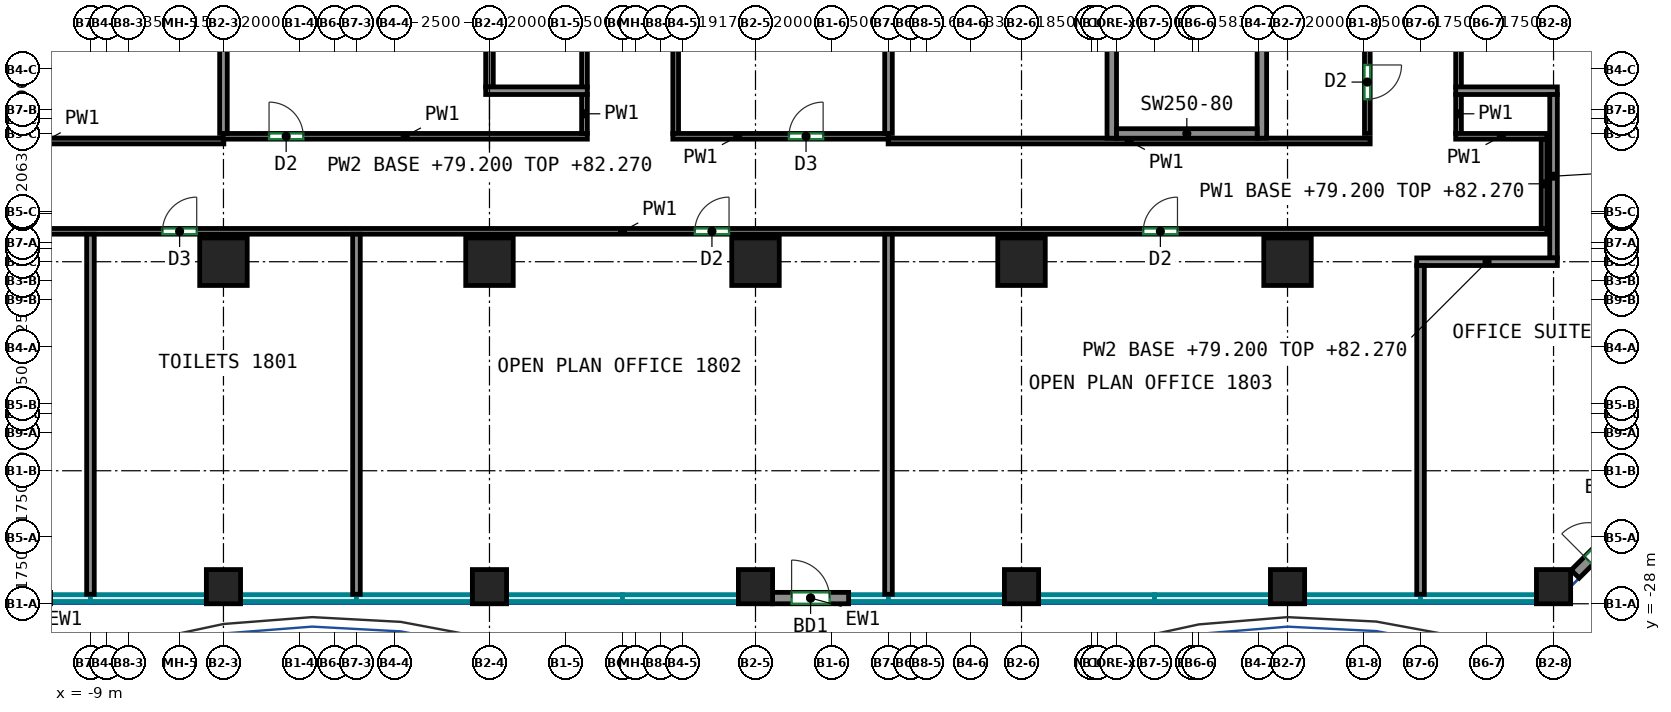
"""IFC4 building model, lengths in metres.
Left out: names, types, materials, properties, quantities, classifications, styles, units other than length and angle.
Written with IfcOpenShell. Run it as: python <this file> out.ifc"""

import sys

from ifc_helpers import new_model, si_unit, direction, frame, frame_2d, origin, origin_2d, place, context, subcontext, project, spatial, rectangle, extrude, source, transform, mapped, element, fill, save


model = new_model("IFC4")
c1 = context("Model", 3, precision=1e-05, world=origin(), true_north=direction((0.0, 1.0)))
c2 = subcontext(c1, "Body", "Model", "MODEL_VIEW")
j1 = project(units=[si_unit("LENGTHUNIT", "METRE"), si_unit("PLANEANGLEUNIT", "RADIAN")], contexts=[c1])
p1 = place(None, origin())
s1 = spatial("IfcSite", under=j1, at=p1, CompositionType="ELEMENT")
p2 = place(p1, origin())
s2 = spatial("IfcBuilding", under=s1, at=p2, CompositionType="ELEMENT")
p3 = place(p2, frame((0.0, 0.0, 79.2)))
s3 = spatial("IfcBuildingStorey", under=s2, at=p3, CompositionType="ELEMENT", Elevation=79.2)
m1 = source(origin(), c2, "Body", "SweptSolid", [
    extrude(rectangle(XDim=0.9, YDim=0.9, at=origin_2d()), origin(), (0.0, 0.0, 1.0), 3.72),
])
p4 = place(p3, frame((-5.5, -27.55, 0.0), z_axis=(0.0, 0.0, 1.0), x_axis=(1.0, 0.0, 0.0)))
e1 = element("IfcColumn", 1, at=p4, inside=s3, PredefinedType="COLUMN", context=c2, shape_type="MappedRepresentation", body=[
    mapped(m1, transform((0.0, 0.0, 0.0))),
])
m2 = source(origin(), c2, "Body", "SweptSolid", [
    extrude(rectangle(XDim=1.25, YDim=1.25, at=origin_2d()), origin(), (0.0, 0.0, 1.0), 3.72),
])
p5 = place(p3, frame((-5.5, -19.0, 0.0), z_axis=(0.0, 0.0, 1.0), x_axis=(1.0, 0.0, 0.0)))
e2 = element("IfcColumn", 2, at=p5, inside=s3, PredefinedType="COLUMN", context=c2, shape_type="MappedRepresentation", body=[
    mapped(m2, transform((0.0, 0.0, 0.0))),
])
p6 = place(p3, frame((1.5, -27.55, 0.0), z_axis=(0.0, 0.0, 1.0), x_axis=(1.0, 0.0, 0.0)))
e3 = element("IfcColumn", 3, at=p6, inside=s3, PredefinedType="COLUMN", context=c2, shape_type="MappedRepresentation", body=[
    mapped(m1, transform((0.0, 0.0, 0.0))),
])
p7 = place(p3, frame((1.5, -19.0, 0.0), z_axis=(0.0, 0.0, 1.0), x_axis=(1.0, 0.0, 0.0)))
e4 = element("IfcColumn", 4, at=p7, inside=s3, PredefinedType="COLUMN", context=c2, shape_type="MappedRepresentation", body=[
    mapped(m2, transform((0.0, 0.0, 0.0))),
])
p8 = place(p3, frame((8.5, -27.55, 0.0), z_axis=(0.0, 0.0, 1.0), x_axis=(1.0, 0.0, 0.0)))
e5 = element("IfcColumn", 5, at=p8, inside=s3, PredefinedType="COLUMN", context=c2, shape_type="MappedRepresentation", body=[
    mapped(m1, transform((0.0, 0.0, 0.0))),
])
p9 = place(p3, frame((8.5, -19.0, 0.0), z_axis=(0.0, 0.0, 1.0), x_axis=(1.0, 0.0, 0.0)))
e6 = element("IfcColumn", 6, at=p9, inside=s3, PredefinedType="COLUMN", context=c2, shape_type="MappedRepresentation", body=[
    mapped(m2, transform((0.0, 0.0, 0.0))),
])
p10 = place(p3, frame((15.5, -27.55, 0.0), z_axis=(0.0, 0.0, 1.0), x_axis=(1.0, 0.0, 0.0)))
e7 = element("IfcColumn", 7, at=p10, inside=s3, PredefinedType="COLUMN", context=c2, shape_type="MappedRepresentation", body=[
    mapped(m1, transform((0.0, 0.0, 0.0))),
])
p11 = place(p3, frame((15.5, -19.0, 0.0), z_axis=(0.0, 0.0, 1.0), x_axis=(1.0, 0.0, 0.0)))
e8 = element("IfcColumn", 8, at=p11, inside=s3, PredefinedType="COLUMN", context=c2, shape_type="MappedRepresentation", body=[
    mapped(m2, transform((0.0, 0.0, 0.0))),
])
p12 = place(p3, frame((22.5, -27.55, 0.0), z_axis=(0.0, 0.0, 1.0), x_axis=(1.0, 0.0, 0.0)))
e9 = element("IfcColumn", 9, at=p12, inside=s3, PredefinedType="COLUMN", context=c2, shape_type="MappedRepresentation", body=[
    mapped(m1, transform((0.0, 0.0, 0.0))),
])
p13 = place(p3, frame((22.5, -19.0, 0.0), z_axis=(0.0, 0.0, 1.0), x_axis=(1.0, 0.0, 0.0)))
e10 = element("IfcColumn", 10, at=p13, inside=s3, PredefinedType="COLUMN", context=c2, shape_type="MappedRepresentation", body=[
    mapped(m2, transform((0.0, 0.0, 0.0))),
])
p14 = place(p3, frame((29.5, -27.55, 0.0), z_axis=(0.0, 0.0, 1.0), x_axis=(1.0, 0.0, 0.0)))
e11 = element("IfcColumn", 11, at=p14, inside=s3, PredefinedType="COLUMN", context=c2, shape_type="MappedRepresentation", body=[
    mapped(m1, transform((0.0, 0.0, 0.0))),
])
m3 = source(origin(), c2, "Body", "SweptSolid", [
    extrude(rectangle(XDim=8.0, YDim=0.25, at=frame_2d((4.0, 0.0))), origin(), (0.0, 0.0, 1.0), 3.72),
])
for number, where, z_axis, x_axis in (
    (12, (17.875, -15.75, 0.0), (0.0, 0.0, 1.0), (0.0, 1.0, 0.0)),
    (13, (21.825, -15.75, 0.0), (0.0, 0.0, 1.0), (0.0, 1.0, 0.0)),
):
    element("IfcWall", number, at=place(p3, frame(where, z_axis=z_axis, x_axis=x_axis)), inside=s3, PredefinedType="SHEAR", context=c2, shape_type="MappedRepresentation", body=[
        mapped(m3, transform((0.0, 0.0, 0.0))),
    ])
m4 = source(origin(), c2, "Body", "SweptSolid", [
    extrude(rectangle(XDim=3.7, YDim=0.25, at=frame_2d((1.85, 0.0))), origin(), (0.0, 0.0, 1.0), 3.72),
])
p15 = place(p3, frame((18.0, -15.625, 0.0), z_axis=(0.0, 0.0, 1.0), x_axis=(1.0, 0.0, 0.0)))
e14 = element("IfcWall", 14, at=p15, inside=s3, PredefinedType="SHEAR", context=c2, shape_type="MappedRepresentation", body=[
    mapped(m4, transform((0.0, 0.0, 0.0))),
])
m5 = source(origin(), c2, "Body", "SweptSolid", [
    extrude(rectangle(XDim=2.0, YDim=0.3, at=frame_2d((1.0, 0.0))), origin(), (0.0, 0.0, 1.0), 3.72),
])
p16 = place(p3, frame((8.95, -27.85, 0.0), z_axis=(0.0, 0.0, 1.0), x_axis=(1.0, 0.0, 0.0)))
e15 = element("IfcWall", 15, at=p16, inside=s3, PredefinedType="SOLIDWALL", context=c2, shape_type="MappedRepresentation", body=[
    mapped(m5, transform((0.0, 0.0, 0.0))),
])
p17 = place(p16, frame((0.5, 0.0, 0.0)))
e16 = element("IfcOpeningElement", 16, at=p17, cuts=e15, PredefinedType="OPENING", context=c2, shape_type="SweptSolid", body=[
    extrude(rectangle(XDim=1.0, YDim=2.1, at=frame_2d((0.5, 1.05))), frame((0.0, 0.16, 0.0), z_axis=(0.0, -1.0, 0.0), x_axis=(1.0, 0.0, 0.0)), (0.0, 0.0, 1.0), 0.32),
])
m6 = source(origin(), c2, "Body", "SweptSolid", [
    extrude(rectangle(XDim=2.0, YDim=0.3, at=frame_2d((1.0, 0.0))), origin(), (0.0, 0.0, 1.0), 3.72),
])
p18 = place(p3, frame((30.069, -27.219, 0.0), z_axis=(0.0, 0.0, 1.0), x_axis=(0.707106781187, 0.707106781187, 0.0)))
e17 = element("IfcWall", 17, at=p18, inside=s3, PredefinedType="SOLIDWALL", context=c2, shape_type="MappedRepresentation", body=[
    mapped(m6, transform((0.0, 0.0, 0.0))),
])
p19 = place(p18, frame((0.5, 0.0, 0.0)))
e18 = element("IfcOpeningElement", 18, at=p19, cuts=e17, PredefinedType="OPENING", context=c2, shape_type="SweptSolid", body=[
    extrude(rectangle(XDim=1.0, YDim=2.1, at=frame_2d((0.5, 1.05))), frame((0.0, 0.16, 0.0), z_axis=(0.0, -1.0, 0.0), x_axis=(1.0, 0.0, 0.0)), (0.0, 0.0, 1.0), 0.32),
])
p20 = place(p3, frame((-19.325, -18.2, 0.0), z_axis=(0.0, 0.0, 1.0), x_axis=(1.0, 0.0, 0.0)))
e19 = element("IfcWall", 19, at=p20, inside=s3, PredefinedType="PARTITIONING", context=c2, shape_type="SweptSolid", body=[
    extrude(rectangle(XDim=48.65, YDim=0.15, at=frame_2d((24.325, 0.0))), origin(), (0.0, 0.0, 1.0), 3.72),
])
p21 = place(p20, frame((12.221, 0.0, 0.0)))
e20 = element("IfcOpeningElement", 20, at=p21, cuts=e19, PredefinedType="OPENING", context=c2, shape_type="SweptSolid", body=[
    extrude(rectangle(XDim=0.9, YDim=2.1, at=frame_2d((0.45, 1.05))), frame((0.0, 0.085, 0.0), z_axis=(0.0, -1.0, 0.0), x_axis=(1.0, 0.0, 0.0)), (0.0, 0.0, 1.0), 0.17),
])
p22 = place(p20, frame((26.229, 0.0, 0.0)))
e21 = element("IfcOpeningElement", 21, at=p22, cuts=e19, PredefinedType="OPENING", context=c2, shape_type="SweptSolid", body=[
    extrude(rectangle(XDim=0.9, YDim=2.1, at=frame_2d((0.45, 1.05))), frame((0.0, 0.085, 0.0), z_axis=(0.0, -1.0, 0.0), x_axis=(1.0, 0.0, 0.0)), (0.0, 0.0, 1.0), 0.17),
])
p23 = place(p20, frame((38.029, 0.0, 0.0)))
e22 = element("IfcOpeningElement", 22, at=p23, cuts=e19, PredefinedType="OPENING", context=c2, shape_type="SweptSolid", body=[
    extrude(rectangle(XDim=0.9, YDim=2.1, at=frame_2d((0.45, 1.05))), frame((0.0, 0.085, 0.0), z_axis=(0.0, -1.0, 0.0), x_axis=(1.0, 0.0, 0.0)), (0.0, 0.0, 1.0), 0.17),
])
p24 = place(p3, frame((-14.9, -15.825, 0.0), z_axis=(0.0, 0.0, 1.0), x_axis=(1.0, 0.0, 0.0)))
e23 = element("IfcWall", 23, at=p24, inside=s3, PredefinedType="PARTITIONING", context=c2, shape_type="SweptSolid", body=[
    extrude(rectangle(XDim=9.41, YDim=0.15, at=frame_2d((4.705, 0.0))), origin(), (0.0, 0.0, 1.0), 3.72),
])
p25 = place(p3, frame((-5.51, -15.7, 0.0), z_axis=(0.0, 0.0, 1.0), x_axis=(1.0, 0.0, 0.0)))
e24 = element("IfcWall", 24, at=p25, inside=s3, PredefinedType="PARTITIONING", context=c2, shape_type="SweptSolid", body=[
    extrude(rectangle(XDim=9.585, YDim=0.15, at=frame_2d((4.792, 0.0))), origin(), (0.0, 0.0, 1.0), 3.72),
])
p26 = place(p25, frame((1.21, 0.0, 0.0)))
e25 = element("IfcOpeningElement", 25, at=p26, cuts=e24, PredefinedType="OPENING", context=c2, shape_type="SweptSolid", body=[
    extrude(rectangle(XDim=0.9, YDim=2.1, at=frame_2d((0.45, 1.05))), frame((0.0, 0.085, 0.0), z_axis=(0.0, -1.0, 0.0), x_axis=(1.0, 0.0, 0.0)), (0.0, 0.0, 1.0), 0.17),
])
p27 = place(p3, frame((4.0, -15.625, 0.0), z_axis=(0.0, 0.0, 1.0), x_axis=(0.0, 1.0, 0.0)))
e26 = element("IfcWall", 26, at=p27, inside=s3, PredefinedType="PARTITIONING", context=c2, shape_type="SweptSolid", body=[
    extrude(rectangle(XDim=1.035, YDim=0.15, at=frame_2d((0.518, 0.0))), origin(), (0.0, 0.0, 1.0), 3.72),
])
p28 = place(p3, frame((4.0, -14.41, 0.0), z_axis=(0.0, 0.0, 1.0), x_axis=(0.0, 1.0, 0.0)))
e27 = element("IfcWall", 27, at=p28, inside=s3, PredefinedType="PARTITIONING", context=c2, shape_type="SweptSolid", body=[
    extrude(rectangle(XDim=16.635, YDim=0.15, at=frame_2d((8.317, 0.0))), origin(), (0.0, 0.0, 1.0), 3.72),
])
p29 = place(p28, frame((6.114, 0.0, 0.0)))
e28 = element("IfcOpeningElement", 28, at=p29, cuts=e27, PredefinedType="OPENING", context=c2, shape_type="SweptSolid", body=[
    extrude(rectangle(XDim=1.0, YDim=2.1, at=frame_2d((0.5, 1.05))), frame((0.0, 0.085, 0.0), z_axis=(0.0, -1.0, 0.0), x_axis=(1.0, 0.0, 0.0)), (0.0, 0.0, 1.0), 0.17),
])
p30 = place(p3, frame((27.0, -15.625, 0.0), z_axis=(0.0, 0.0, 1.0), x_axis=(0.0, 1.0, 0.0)))
e29 = element("IfcWall", 29, at=p30, inside=s3, PredefinedType="PARTITIONING", context=c2, shape_type="SweptSolid", body=[
    extrude(rectangle(XDim=1.035, YDim=0.15, at=frame_2d((0.518, 0.0))), origin(), (0.0, 0.0, 1.0), 3.72),
])
p31 = place(p3, frame((26.925, -15.7, 0.0), z_axis=(0.0, 0.0, 1.0), x_axis=(1.0, 0.0, 0.0)))
e30 = element("IfcWall", 30, at=p31, inside=s3, PredefinedType="PARTITIONING", context=c2, shape_type="SweptSolid", body=[
    extrude(rectangle(XDim=2.4, YDim=0.15, at=frame_2d((1.2, 0.0))), origin(), (0.0, 0.0, 1.0), 3.72),
])
p32 = place(p3, frame((29.25, -18.125, 0.0), z_axis=(0.0, 0.0, 1.0), x_axis=(0.0, 1.0, 0.0)))
e31 = element("IfcWall", 31, at=p32, inside=s3, PredefinedType="PARTITIONING", context=c2, shape_type="SweptSolid", body=[
    extrude(rectangle(XDim=2.35, YDim=0.15, at=frame_2d((1.175, 0.0))), origin(), (0.0, 0.0, 1.0), 3.07),
])
p33 = place(p3, frame((6.4, -15.625, 0.0), z_axis=(0.0, 0.0, 1.0), x_axis=(0.0, 1.0, 0.0)))
e32 = element("IfcWall", 32, at=p33, inside=s3, PredefinedType="PARTITIONING", context=c2, shape_type="SweptSolid", body=[
    extrude(rectangle(XDim=5.535, YDim=0.15, at=frame_2d((2.768, 0.0))), origin(), (0.0, 0.0, 1.0), 3.72),
])
p34 = place(p3, frame((6.325, -15.7, 0.0), z_axis=(0.0, 0.0, 1.0), x_axis=(1.0, 0.0, 0.0)))
e33 = element("IfcWall", 33, at=p34, inside=s3, PredefinedType="PARTITIONING", context=c2, shape_type="SweptSolid", body=[
    extrude(rectangle(XDim=5.685, YDim=0.15, at=frame_2d((2.843, 0.0))), origin(), (0.0, 0.0, 1.0), 3.72),
])
p35 = place(p34, frame((3.055, 0.0, 0.0)))
e34 = element("IfcOpeningElement", 34, at=p35, cuts=e33, PredefinedType="OPENING", context=c2, shape_type="SweptSolid", body=[
    extrude(rectangle(XDim=0.9, YDim=2.1, at=frame_2d((0.45, 1.05))), frame((0.0, 0.085, 0.0), z_axis=(0.0, -1.0, 0.0), x_axis=(1.0, 0.0, 0.0)), (0.0, 0.0, 1.0), 0.17),
])
p36 = place(p3, frame((11.99, -15.825, 0.0), z_axis=(0.0, 0.0, 1.0), x_axis=(1.0, 0.0, 0.0)))
e35 = element("IfcWall", 35, at=p36, inside=s3, PredefinedType="PARTITIONING", context=c2, shape_type="SweptSolid", body=[
    extrude(rectangle(XDim=12.685, YDim=0.15, at=frame_2d((6.343, 0.0))), origin(), (0.0, 0.0, 1.0), 3.72),
])
p37 = place(p3, frame((24.6, 2.225, 0.0), z_axis=(0.0, 0.0, 1.0), x_axis=(0.0, -1.0, 0.0)))
e36 = element("IfcWall", 36, at=p37, inside=s3, PredefinedType="PARTITIONING", context=c2, shape_type="SweptSolid", body=[
    extrude(rectangle(XDim=17.85, YDim=0.15, at=frame_2d((8.925, 0.0))), origin(), (0.0, 0.0, 1.0), 3.72),
])
p38 = place(p37, frame((16.048, 0.0, 0.0)))
e37 = element("IfcOpeningElement", 37, at=p38, cuts=e36, PredefinedType="OPENING", context=c2, shape_type="SweptSolid", body=[
    extrude(rectangle(XDim=0.9, YDim=2.1, at=frame_2d((0.45, 1.05))), frame((0.0, 0.085, 0.0), z_axis=(0.0, -1.0, 0.0), x_axis=(1.0, 0.0, 0.0)), (0.0, 0.0, 1.0), 0.17),
])
p39 = place(p3, frame((27.0, -14.41, 0.0), z_axis=(0.0, 0.0, 1.0), x_axis=(0.0, 1.0, 0.0)))
e38 = element("IfcWall", 38, at=p39, inside=s3, PredefinedType="PARTITIONING", context=c2, shape_type="SweptSolid", body=[
    extrude(rectangle(XDim=16.635, YDim=0.15, at=frame_2d((8.317, 0.0))), origin(), (0.0, 0.0, 1.0), 3.72),
])
p40 = place(p39, frame((4.41, 0.0, 0.0)))
e39 = element("IfcOpeningElement", 39, at=p40, cuts=e38, PredefinedType="OPENING", context=c2, shape_type="SweptSolid", body=[
    extrude(rectangle(XDim=1.0, YDim=2.1, at=frame_2d((0.5, 1.05))), frame((0.0, 0.085, 0.0), z_axis=(0.0, -1.0, 0.0), x_axis=(1.0, 0.0, 0.0)), (0.0, 0.0, 1.0), 0.17),
])
p41 = place(p3, frame((-9.0, -27.75, 0.0), z_axis=(0.0, 0.0, 1.0), x_axis=(0.0, 1.0, 0.0)))
e40 = element("IfcWall", 40, at=p41, inside=s3, PredefinedType="PARTITIONING", context=c2, shape_type="SweptSolid", body=[
    extrude(rectangle(XDim=9.474, YDim=0.2, at=frame_2d((4.737, 0.0))), origin(), (0.0, 0.0, 1.0), 3.72),
])
p42 = place(p3, frame((-5.5, -15.624, 0.0), z_axis=(0.0, 0.0, 1.0), x_axis=(0.0, 1.0, 0.0)))
e41 = element("IfcWall", 41, at=p42, inside=s3, PredefinedType="PARTITIONING", context=c2, shape_type="SweptSolid", body=[
    extrude(rectangle(XDim=4.999, YDim=0.2, at=frame_2d((2.5, 0.0))), origin(), (0.0, 0.0, 1.0), 3.07),
])
p43 = place(p3, frame((-2.0, -27.75, 0.0), z_axis=(0.0, 0.0, 1.0), x_axis=(0.0, 1.0, 0.0)))
e42 = element("IfcWall", 42, at=p43, inside=s3, PredefinedType="PARTITIONING", context=c2, shape_type="SweptSolid", body=[
    extrude(rectangle(XDim=9.474, YDim=0.2, at=frame_2d((4.737, 0.0))), origin(), (0.0, 0.0, 1.0), 3.72),
])
p44 = place(p3, frame((1.5, -14.4, 0.0), z_axis=(0.0, 0.0, 1.0), x_axis=(0.0, 1.0, 0.0)))
e43 = element("IfcWall", 43, at=p44, inside=s3, PredefinedType="PARTITIONING", context=c2, shape_type="SweptSolid", body=[
    extrude(rectangle(XDim=3.775, YDim=0.2, at=frame_2d((1.887, 0.0))), origin(), (0.0, 0.0, 1.0), 3.07),
])
p45 = place(p3, frame((1.4, -14.5, 0.0), z_axis=(0.0, 0.0, 1.0), x_axis=(1.0, 0.0, 0.0)))
e44 = element("IfcWall", 44, at=p45, inside=s3, PredefinedType="PARTITIONING", context=c2, shape_type="SweptSolid", body=[
    extrude(rectangle(XDim=2.674, YDim=0.2, at=frame_2d((1.337, 0.0))), origin(), (0.0, 0.0, 1.0), 3.72),
])
p46 = place(p3, frame((12.0, -27.75, 0.0), z_axis=(0.0, 0.0, 1.0), x_axis=(0.0, 1.0, 0.0)))
e45 = element("IfcWall", 45, at=p46, inside=s3, PredefinedType="PARTITIONING", context=c2, shape_type="SweptSolid", body=[
    extrude(rectangle(XDim=9.474, YDim=0.2, at=frame_2d((4.737, 0.0))), origin(), (0.0, 0.0, 1.0), 3.72),
])
p47 = place(p3, frame((26.926, -14.5, 0.0), z_axis=(0.0, 0.0, 1.0), x_axis=(1.0, 0.0, 0.0)))
e46 = element("IfcWall", 46, at=p47, inside=s3, PredefinedType="PARTITIONING", context=c2, shape_type="SweptSolid", body=[
    extrude(rectangle(XDim=2.674, YDim=0.2, at=frame_2d((1.337, 0.0))), origin(), (0.0, 0.0, 1.0), 3.72),
])
p48 = place(p3, frame((29.5, -18.9, 0.0), z_axis=(0.0, 0.0, 1.0), x_axis=(0.0, 1.0, 0.0)))
e47 = element("IfcWall", 47, at=p48, inside=s3, PredefinedType="PARTITIONING", context=c2, shape_type="SweptSolid", body=[
    extrude(rectangle(XDim=4.3, YDim=0.2, at=frame_2d((2.15, 0.0))), origin(), (0.0, 0.0, 1.0), 3.07),
])
p49 = place(p3, frame((25.9, -19.0, 0.0), z_axis=(0.0, 0.0, 1.0), x_axis=(1.0, 0.0, 0.0)))
e48 = element("IfcWall", 48, at=p49, inside=s3, PredefinedType="PARTITIONING", context=c2, shape_type="SweptSolid", body=[
    extrude(rectangle(XDim=3.7, YDim=0.2, at=frame_2d((1.85, 0.0))), origin(), (0.0, 0.0, 1.0), 3.07),
])
p50 = place(p3, frame((26.0, -27.75, 0.0), z_axis=(0.0, 0.0, 1.0), x_axis=(0.0, 1.0, 0.0)))
e49 = element("IfcWall", 49, at=p50, inside=s3, PredefinedType="PARTITIONING", context=c2, shape_type="SweptSolid", body=[
    extrude(rectangle(XDim=8.65, YDim=0.2, at=frame_2d((4.325, 0.0))), origin(), (0.0, 0.0, 1.0), 3.72),
])
p51 = place(p3, frame((12.0, -15.624, 0.0), z_axis=(0.0, 0.0, 1.0), x_axis=(0.0, 1.0, 0.0)))
e50 = element("IfcWall", 50, at=p51, inside=s3, PredefinedType="PARTITIONING", context=c2, shape_type="SweptSolid", body=[
    extrude(rectangle(XDim=5.524, YDim=0.2, at=frame_2d((2.762, 0.0))), origin(), (0.0, 0.0, 1.0), 3.72),
])
p52 = place(p17, origin())
e51 = element("IfcDoor", 51, at=p52, inside=s3, OperationType="SINGLE_SWING_LEFT", PredefinedType="DOOR", context=c2, shape_type="SweptSolid", body=[
    extrude(rectangle(XDim=1.0, YDim=2.1, at=frame_2d((0.5, 1.05))), frame((0.0, 0.025, 0.0), z_axis=(0.0, -1.0, 0.0), x_axis=(1.0, 0.0, 0.0)), (0.0, 0.0, 1.0), 0.05),
])
fill(e16, e51)
p53 = place(p19, origin())
e52 = element("IfcDoor", 52, at=p53, inside=s3, OperationType="SINGLE_SWING_LEFT", PredefinedType="DOOR", context=c2, shape_type="SweptSolid", body=[
    extrude(rectangle(XDim=1.0, YDim=2.1, at=frame_2d((0.5, 1.05))), frame((0.0, 0.025, 0.0), z_axis=(0.0, -1.0, 0.0), x_axis=(1.0, 0.0, 0.0)), (0.0, 0.0, 1.0), 0.05),
])
fill(e18, e52)
p54 = place(p21, origin())
e53 = element("IfcDoor", 53, at=p54, inside=s3, OperationType="SINGLE_SWING_RIGHT", PredefinedType="DOOR", context=c2, shape_type="SweptSolid", body=[
    extrude(rectangle(XDim=0.9, YDim=2.1, at=frame_2d((0.45, 1.05))), frame((0.0, 0.025, 0.0), z_axis=(0.0, -1.0, 0.0), x_axis=(1.0, 0.0, 0.0)), (0.0, 0.0, 1.0), 0.05),
])
fill(e20, e53)
p55 = place(p22, origin())
e54 = element("IfcDoor", 54, at=p55, inside=s3, OperationType="SINGLE_SWING_RIGHT", PredefinedType="DOOR", context=c2, shape_type="SweptSolid", body=[
    extrude(rectangle(XDim=0.9, YDim=2.1, at=frame_2d((0.45, 1.05))), frame((0.0, 0.025, 0.0), z_axis=(0.0, -1.0, 0.0), x_axis=(1.0, 0.0, 0.0)), (0.0, 0.0, 1.0), 0.05),
])
fill(e21, e54)
p56 = place(p23, origin())
e55 = element("IfcDoor", 55, at=p56, inside=s3, OperationType="SINGLE_SWING_RIGHT", PredefinedType="DOOR", context=c2, shape_type="SweptSolid", body=[
    extrude(rectangle(XDim=0.9, YDim=2.1, at=frame_2d((0.45, 1.05))), frame((0.0, 0.025, 0.0), z_axis=(0.0, -1.0, 0.0), x_axis=(1.0, 0.0, 0.0)), (0.0, 0.0, 1.0), 0.05),
])
fill(e22, e55)
p57 = place(p26, origin())
e56 = element("IfcDoor", 56, at=p57, inside=s3, OperationType="SINGLE_SWING_LEFT", PredefinedType="DOOR", context=c2, shape_type="SweptSolid", body=[
    extrude(rectangle(XDim=0.9, YDim=2.1, at=frame_2d((0.45, 1.05))), frame((0.0, 0.025, 0.0), z_axis=(0.0, -1.0, 0.0), x_axis=(1.0, 0.0, 0.0)), (0.0, 0.0, 1.0), 0.05),
])
fill(e25, e56)
p58 = place(p35, origin())
e57 = element("IfcDoor", 57, at=p58, inside=s3, OperationType="SINGLE_SWING_RIGHT", PredefinedType="DOOR", context=c2, shape_type="SweptSolid", body=[
    extrude(rectangle(XDim=0.9, YDim=2.1, at=frame_2d((0.45, 1.05))), frame((0.0, 0.025, 0.0), z_axis=(0.0, -1.0, 0.0), x_axis=(1.0, 0.0, 0.0)), (0.0, 0.0, 1.0), 0.05),
])
fill(e34, e57)
p59 = place(p38, origin())
e58 = element("IfcDoor", 58, at=p59, inside=s3, OperationType="SINGLE_SWING_LEFT", PredefinedType="DOOR", context=c2, shape_type="SweptSolid", body=[
    extrude(rectangle(XDim=0.9, YDim=2.1, at=frame_2d((0.45, 1.05))), frame((0.0, 0.025, 0.0), z_axis=(0.0, -1.0, 0.0), x_axis=(1.0, 0.0, 0.0)), (0.0, 0.0, 1.0), 0.05),
])
fill(e37, e58)
save(model, sys.argv[1])
